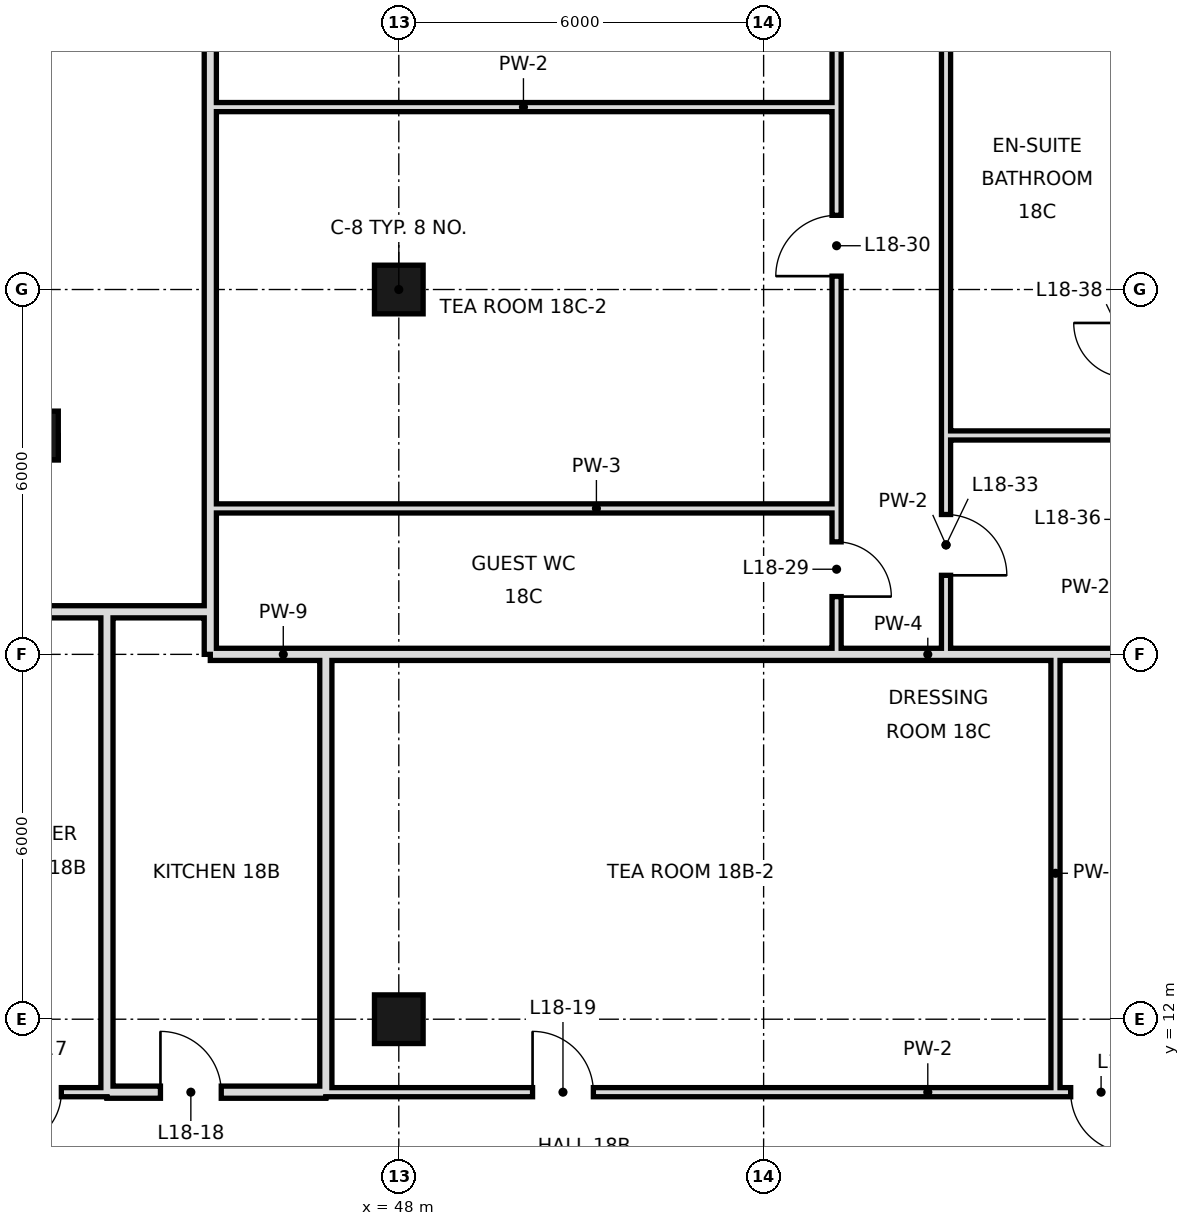
"""IFC4 building model, lengths in metres.
Left out: names, types, materials, properties, quantities, classifications, styles, units other than length and angle.
Written with IfcOpenShell. Run it as: python <this file> out.ifc"""

import sys

from ifc_helpers import new_model, si_unit, direction, frame, frame_2d, origin, origin_2d, place, context, subcontext, project, spatial, rectangle, hollow_rectangle, extrude, element, fill, save


model = new_model("IFC4")
c1 = context("Model", 3, precision=1e-05, world=origin(), true_north=direction((0.0, 1.0)))
c2 = subcontext(c1, "Body", "Model", "MODEL_VIEW")
j1 = project(units=[si_unit("LENGTHUNIT", "METRE"), si_unit("PLANEANGLEUNIT", "RADIAN")], contexts=[c1])
p1 = place(None, origin())
s1 = spatial("IfcSite", under=j1, at=p1, CompositionType="ELEMENT")
p2 = place(p1, origin())
s2 = spatial("IfcBuilding", under=s1, at=p2, CompositionType="ELEMENT")
p3 = place(p2, frame((0.0, 0.0, 85.8)))
s3 = spatial("IfcBuildingStorey", under=s2, at=p3, CompositionType="ELEMENT", Elevation=85.8)
p4 = place(p3, frame((42.0, 21.6, 0.0), z_axis=(0.0, 0.0, 1.0), x_axis=(1.0, 0.0, 0.0)))
e1 = element("IfcColumn", 1, at=p4, inside=s3, PredefinedType="COLUMN", context=c2, shape_type="SweptSolid", body=[
    extrude(hollow_rectangle(XDim=0.8, YDim=0.8, WallThickness=0.06, at=origin_2d()), origin(), (0.0, 0.0, 1.0), 4.4),
])
for number, where, z_axis, x_axis in (
    (2, (48.0, 12.0, 0.0), (0.0, 0.0, 1.0), (1.0, 0.0, 0.0)),
    (3, (48.0, 24.0, 0.0), (0.0, 0.0, 1.0), (1.0, 0.0, 0.0)),
):
    element("IfcColumn", number, at=place(p3, frame(where, z_axis=z_axis, x_axis=x_axis)), inside=s3, PredefinedType="COLUMN", context=c2, shape_type="SweptSolid", body=[
        extrude(hollow_rectangle(XDim=0.8, YDim=0.8, WallThickness=0.04, at=origin_2d()), origin(), (0.0, 0.0, 1.0), 4.4),
    ])
p5 = place(p3, frame((43.2, 10.8, 0.0), z_axis=(0.0, 0.0, 1.0), x_axis=(0.0, 1.0, 0.0)))
e4 = element("IfcWall", 4, at=p5, inside=s3, PredefinedType="SOLIDWALL", context=c2, shape_type="SweptSolid", body=[
    extrude(rectangle(XDim=7.9, YDim=0.2, at=frame_2d((3.95, 0.0))), origin(), (0.0, 0.0, 1.0), 3.4),
])
p6 = place(p3, frame((44.9, 18.7, 0.0), z_axis=(0.0, 0.0, 1.0), x_axis=(0.0, 1.0, 0.0)))
e5 = element("IfcWall", 5, at=p6, inside=s3, PredefinedType="SOLIDWALL", context=c2, shape_type="SweptSolid", body=[
    extrude(rectangle(XDim=25.1, YDim=0.2, at=frame_2d((12.55, 0.0))), origin(), (0.0, 0.0, 1.0), 3.65),
])
p7 = place(p6, frame((22.72, 0.0, 0.0)))
e6 = element("IfcOpeningElement", 6, at=p7, cuts=e5, PredefinedType="OPENING", context=c2, shape_type="SweptSolid", body=[
    extrude(rectangle(XDim=1.2, YDim=2.4, at=frame_2d((0.6, 1.2))), frame((0.0, 0.11, 0.0), z_axis=(0.0, -1.0, 0.0), x_axis=(1.0, 0.0, 0.0)), (0.0, 0.0, 1.0), 0.22),
])
p8 = place(p3, frame((44.9, 18.0, 0.0), z_axis=(0.0, 0.0, 1.0), x_axis=(0.0, 1.0, 0.0)))
e7 = element("IfcWall", 7, at=p8, inside=s3, PredefinedType="SOLIDWALL", context=c2, shape_type="SweptSolid", body=[
    extrude(rectangle(XDim=0.7, YDim=0.2, at=frame_2d((0.35, 0.0))), origin(), (0.0, 0.0, 1.0), 3.65),
])
p9 = place(p3, frame((46.8, 10.8, 0.0), z_axis=(0.0, 0.0, 1.0), x_axis=(0.0, 1.0, 0.0)))
e8 = element("IfcWall", 8, at=p9, inside=s3, PredefinedType="SOLIDWALL", context=c2, shape_type="SweptSolid", body=[
    extrude(rectangle(XDim=7.2, YDim=0.2, at=frame_2d((3.6, 0.0))), origin(), (0.0, 0.0, 1.0), 3.4),
])
p10 = place(p3, frame((55.2, 20.4, 0.0), z_axis=(0.0, 0.0, 1.0), x_axis=(0.0, 1.0, 0.0)))
e9 = element("IfcWall", 9, at=p10, inside=s3, PredefinedType="PARTITIONING", context=c2, shape_type="SweptSolid", body=[
    extrude(rectangle(XDim=23.4, YDim=0.15, at=frame_2d((11.7, 0.0))), origin(), (0.0, 0.0, 1.0), 4.1),
])
p11 = place(p10, frame((19.84, 0.0, 0.0)))
e10 = element("IfcOpeningElement", 10, at=p11, cuts=e9, PredefinedType="OPENING", context=c2, shape_type="SweptSolid", body=[
    extrude(rectangle(XDim=1.0, YDim=2.4, at=frame_2d((0.5, 1.2))), frame((0.0, 0.085, 0.0), z_axis=(0.0, -1.0, 0.0), x_axis=(1.0, 0.0, 0.0)), (0.0, 0.0, 1.0), 0.17),
])
p12 = place(p10, frame((3.82, 0.0, 0.0)))
e11 = element("IfcOpeningElement", 11, at=p12, cuts=e9, PredefinedType="OPENING", context=c2, shape_type="SweptSolid", body=[
    extrude(rectangle(XDim=1.0, YDim=2.4, at=frame_2d((0.5, 1.2))), frame((0.0, 0.085, 0.0), z_axis=(0.0, -1.0, 0.0), x_axis=(1.0, 0.0, 0.0)), (0.0, 0.0, 1.0), 0.17),
])
p13 = place(p10, frame((14.2, 0.0, 0.0)))
e12 = element("IfcOpeningElement", 12, at=p13, cuts=e9, PredefinedType="OPENING", context=c2, shape_type="SweptSolid", body=[
    extrude(rectangle(XDim=1.0, YDim=2.4, at=frame_2d((0.5, 1.2))), frame((0.0, 0.085, 0.0), z_axis=(0.0, -1.0, 0.0), x_axis=(1.0, 0.0, 0.0)), (0.0, 0.0, 1.0), 0.17),
])
p14 = place(p3, frame((55.2, 18.0, 0.0), z_axis=(0.0, 0.0, 1.0), x_axis=(0.0, 1.0, 0.0)))
e13 = element("IfcWall", 13, at=p14, inside=s3, PredefinedType="PARTITIONING", context=c2, shape_type="SweptSolid", body=[
    extrude(rectangle(XDim=2.4, YDim=0.15, at=frame_2d((1.2, 0.0))), origin(), (0.0, 0.0, 1.0), 4.1),
])
p15 = place(p14, frame((0.95, 0.0, 0.0)))
e14 = element("IfcOpeningElement", 14, at=p15, cuts=e13, PredefinedType="OPENING", context=c2, shape_type="SweptSolid", body=[
    extrude(rectangle(XDim=0.9, YDim=2.4, at=frame_2d((0.45, 1.2))), frame((0.0, 0.085, 0.0), z_axis=(0.0, -1.0, 0.0), x_axis=(1.0, 0.0, 0.0)), (0.0, 0.0, 1.0), 0.17),
])
p16 = place(p3, frame((57.0, 18.0, 0.0), z_axis=(0.0, 0.0, 1.0), x_axis=(0.0, 1.0, 0.0)))
e15 = element("IfcWall", 15, at=p16, inside=s3, PredefinedType="PARTITIONING", context=c2, shape_type="SweptSolid", body=[
    extrude(rectangle(XDim=3.6, YDim=0.15, at=frame_2d((1.8, 0.0))), origin(), (0.0, 0.0, 1.0), 4.1),
])
p17 = place(p16, frame((1.3, 0.0, 0.0)))
e16 = element("IfcOpeningElement", 16, at=p17, cuts=e15, PredefinedType="OPENING", context=c2, shape_type="SweptSolid", body=[
    extrude(rectangle(XDim=1.0, YDim=2.4, at=frame_2d((0.5, 1.2))), frame((0.0, 0.085, 0.0), z_axis=(0.0, -1.0, 0.0), x_axis=(1.0, 0.0, 0.0)), (0.0, 0.0, 1.0), 0.17),
])
p18 = place(p3, frame((57.0, 21.6, 0.0), z_axis=(0.0, 0.0, 1.0), x_axis=(0.0, 1.0, 0.0)))
e17 = element("IfcWall", 17, at=p18, inside=s3, PredefinedType="PARTITIONING", context=c2, shape_type="SweptSolid", body=[
    extrude(rectangle(XDim=8.4, YDim=0.15, at=frame_2d((4.2, 0.0))), origin(), (0.0, 0.0, 1.0), 4.1),
])
p19 = place(p3, frame((58.8, 10.8, 0.0), z_axis=(0.0, 0.0, 1.0), x_axis=(0.0, 1.0, 0.0)))
e18 = element("IfcWall", 18, at=p19, inside=s3, PredefinedType="PARTITIONING", context=c2, shape_type="SweptSolid", body=[
    extrude(rectangle(XDim=7.2, YDim=0.15, at=frame_2d((3.6, 0.0))), origin(), (0.0, 0.0, 1.0), 4.1),
])
p20 = place(p3, frame((43.2, 10.8, 0.0), z_axis=(0.0, 0.0, 1.0), x_axis=(1.0, 0.0, 0.0)))
e19 = element("IfcWall", 19, at=p20, inside=s3, PredefinedType="SOLIDWALL", context=c2, shape_type="SweptSolid", body=[
    extrude(rectangle(XDim=3.6, YDim=0.2, at=frame_2d((1.8, 0.0))), origin(), (0.0, 0.0, 1.0), 4.1),
])
p21 = place(p20, frame((0.88, 0.0, 0.0)))
e20 = element("IfcOpeningElement", 20, at=p21, cuts=e19, PredefinedType="OPENING", context=c2, shape_type="SweptSolid", body=[
    extrude(rectangle(XDim=1.0, YDim=2.4, at=frame_2d((0.5, 1.2))), frame((0.0, 0.11, 0.0), z_axis=(0.0, -1.0, 0.0), x_axis=(1.0, 0.0, 0.0)), (0.0, 0.0, 1.0), 0.22),
])
p22 = place(p3, frame((46.8, 10.8, 0.0), z_axis=(0.0, 0.0, 1.0), x_axis=(1.0, 0.0, 0.0)))
e21 = element("IfcWall", 21, at=p22, inside=s3, PredefinedType="PARTITIONING", context=c2, shape_type="SweptSolid", body=[
    extrude(rectangle(XDim=19.8, YDim=0.15, at=frame_2d((9.9, 0.0))), origin(), (0.0, 0.0, 1.0), 4.1),
])
p23 = place(p22, frame((3.4, 0.0, 0.0)))
e22 = element("IfcOpeningElement", 22, at=p23, cuts=e21, PredefinedType="OPENING", context=c2, shape_type="SweptSolid", body=[
    extrude(rectangle(XDim=1.0, YDim=2.4, at=frame_2d((0.5, 1.2))), frame((0.0, 0.085, 0.0), z_axis=(0.0, -1.0, 0.0), x_axis=(1.0, 0.0, 0.0)), (0.0, 0.0, 1.0), 0.17),
])
p24 = place(p22, frame((12.25, 0.0, 0.0)))
e23 = element("IfcOpeningElement", 23, at=p24, cuts=e21, PredefinedType="OPENING", context=c2, shape_type="SweptSolid", body=[
    extrude(rectangle(XDim=1.0, YDim=2.4, at=frame_2d((0.5, 1.2))), frame((0.0, 0.085, 0.0), z_axis=(0.0, -1.0, 0.0), x_axis=(1.0, 0.0, 0.0)), (0.0, 0.0, 1.0), 0.17),
])
p25 = place(p3, frame((40.8, 10.8, 0.0), z_axis=(0.0, 0.0, 1.0), x_axis=(1.0, 0.0, 0.0)))
e24 = element("IfcWall", 24, at=p25, inside=s3, PredefinedType="PARTITIONING", context=c2, shape_type="SweptSolid", body=[
    extrude(rectangle(XDim=2.4, YDim=0.15, at=frame_2d((1.2, 0.0))), origin(), (0.0, 0.0, 1.0), 4.1),
])
p26 = place(p25, frame((0.75, 0.0, 0.0)))
e25 = element("IfcOpeningElement", 25, at=p26, cuts=e24, PredefinedType="OPENING", context=c2, shape_type="SweptSolid", body=[
    extrude(rectangle(XDim=0.9, YDim=2.4, at=frame_2d((0.45, 1.2))), frame((0.0, 0.085, 0.0), z_axis=(0.0, -1.0, 0.0), x_axis=(1.0, 0.0, 0.0)), (0.0, 0.0, 1.0), 0.17),
])
p27 = place(p3, frame((44.9, 18.0, 0.0), z_axis=(0.0, 0.0, 1.0), x_axis=(1.0, 0.0, 0.0)))
e26 = element("IfcWall", 26, at=p27, inside=s3, PredefinedType="SOLIDWALL", context=c2, shape_type="SweptSolid", body=[
    extrude(rectangle(XDim=1.9, YDim=0.2, at=frame_2d((0.95, 0.0))), origin(), (0.0, 0.0, 1.0), 3.65),
])
p28 = place(p3, frame((46.8, 18.0, 0.0), z_axis=(0.0, 0.0, 1.0), x_axis=(1.0, 0.0, 0.0)))
e27 = element("IfcWall", 27, at=p28, inside=s3, PredefinedType="SOLIDWALL", context=c2, shape_type="SweptSolid", body=[
    extrude(rectangle(XDim=19.8, YDim=0.2, at=frame_2d((9.9, 0.0))), origin(), (0.0, 0.0, 1.0), 3.2),
])
p29 = place(p3, frame((5.4, 18.7, 0.0), z_axis=(0.0, 0.0, 1.0), x_axis=(1.0, 0.0, 0.0)))
e28 = element("IfcWall", 28, at=p29, inside=s3, PredefinedType="SOLIDWALL", context=c2, shape_type="SweptSolid", body=[
    extrude(rectangle(XDim=37.8, YDim=0.2, at=frame_2d((18.9, 0.0))), origin(), (0.0, 0.0, 1.0), 3.4),
])
p30 = place(p29, frame((27.6, 0.0, 0.0)))
e29 = element("IfcOpeningElement", 29, at=p30, cuts=e28, PredefinedType="OPENING", context=c2, shape_type="SweptSolid", body=[
    extrude(rectangle(XDim=1.2, YDim=2.4, at=frame_2d((0.6, 1.2))), frame((0.0, 0.11, 0.0), z_axis=(0.0, -1.0, 0.0), x_axis=(1.0, 0.0, 0.0)), (0.0, 0.0, 1.0), 0.22),
])
p31 = place(p29, frame((32.4, 0.0, 0.0)))
e30 = element("IfcOpeningElement", 30, at=p31, cuts=e28, PredefinedType="OPENING", context=c2, shape_type="SweptSolid", body=[
    extrude(rectangle(XDim=1.2, YDim=2.4, at=frame_2d((0.6, 1.2))), frame((0.0, 0.11, 0.0), z_axis=(0.0, -1.0, 0.0), x_axis=(1.0, 0.0, 0.0)), (0.0, 0.0, 1.0), 0.22),
])
p32 = place(p3, frame((43.2, 18.7, 0.0), z_axis=(0.0, 0.0, 1.0), x_axis=(1.0, 0.0, 0.0)))
e31 = element("IfcWall", 31, at=p32, inside=s3, PredefinedType="SOLIDWALL", context=c2, shape_type="SweptSolid", body=[
    extrude(rectangle(XDim=1.7, YDim=0.2, at=frame_2d((0.85, 0.0))), origin(), (0.0, 0.0, 1.0), 4.1),
])
p33 = place(p3, frame((44.9, 20.4, 0.0), z_axis=(0.0, 0.0, 1.0), x_axis=(1.0, 0.0, 0.0)))
e32 = element("IfcWall", 32, at=p33, inside=s3, PredefinedType="PARTITIONING", context=c2, shape_type="SweptSolid", body=[
    extrude(rectangle(XDim=10.3, YDim=0.15, at=frame_2d((5.15, 0.0))), origin(), (0.0, 0.0, 1.0), 4.1),
])
p34 = place(p3, frame((57.0, 21.6, 0.0), z_axis=(0.0, 0.0, 1.0), x_axis=(1.0, 0.0, 0.0)))
e33 = element("IfcWall", 33, at=p34, inside=s3, PredefinedType="PARTITIONING", context=c2, shape_type="SweptSolid", body=[
    extrude(rectangle(XDim=3.0, YDim=0.15, at=frame_2d((1.5, 0.0))), origin(), (0.0, 0.0, 1.0), 4.1),
])
p35 = place(p3, frame((44.9, 27.0, 0.0), z_axis=(0.0, 0.0, 1.0), x_axis=(1.0, 0.0, 0.0)))
e34 = element("IfcWall", 34, at=p35, inside=s3, PredefinedType="PARTITIONING", context=c2, shape_type="SweptSolid", body=[
    extrude(rectangle(XDim=10.3, YDim=0.15, at=frame_2d((5.15, 0.0))), origin(), (0.0, 0.0, 1.0), 4.1),
])
p36 = place(p3, frame((5.6, 21.4, 0.0), z_axis=(0.0, 0.0, 1.0), x_axis=(1.0, 0.0, 0.0)))
e35 = element("IfcWall", 35, at=p36, inside=s3, PredefinedType="SOLIDWALL", context=c2, shape_type="SweptSolid", body=[
    extrude(rectangle(XDim=36.8, YDim=0.4, at=frame_2d((18.4, 0.0))), origin(), (0.0, 0.0, 1.0), 4.1),
])
p37 = place(p36, frame((8.5, 0.0, 0.0)))
e36 = element("IfcOpeningElement", 36, at=p37, cuts=e35, PredefinedType="OPENING", context=c2, shape_type="SweptSolid", body=[
    extrude(rectangle(XDim=1.8, YDim=2.1, at=frame_2d((0.9, 1.05))), frame((0.0, 0.21, 0.0), z_axis=(0.0, -1.0, 0.0), x_axis=(1.0, 0.0, 0.0)), (0.0, 0.0, 1.0), 0.42),
])
p38 = place(p36, frame((17.5, 0.0, 0.0)))
e37 = element("IfcOpeningElement", 37, at=p38, cuts=e35, PredefinedType="OPENING", context=c2, shape_type="SweptSolid", body=[
    extrude(rectangle(XDim=1.8, YDim=2.1, at=frame_2d((0.9, 1.05))), frame((0.0, 0.21, 0.0), z_axis=(0.0, -1.0, 0.0), x_axis=(1.0, 0.0, 0.0)), (0.0, 0.0, 1.0), 0.42),
])
p39 = place(p36, frame((26.5, 0.0, 0.0)))
e38 = element("IfcOpeningElement", 38, at=p39, cuts=e35, PredefinedType="OPENING", context=c2, shape_type="SweptSolid", body=[
    extrude(rectangle(XDim=1.8, YDim=2.1, at=frame_2d((0.9, 1.05))), frame((0.0, 0.21, 0.0), z_axis=(0.0, -1.0, 0.0), x_axis=(1.0, 0.0, 0.0)), (0.0, 0.0, 1.0), 0.42),
])
p40 = place(p36, frame((4.5, 0.0, 0.0)))
e39 = element("IfcOpeningElement", 39, at=p40, cuts=e35, PredefinedType="OPENING", context=c2, shape_type="SweptSolid", body=[
    extrude(rectangle(XDim=1.2, YDim=2.1, at=frame_2d((0.6, 1.05))), frame((0.0, 0.21, 0.0), z_axis=(0.0, -1.0, 0.0), x_axis=(1.0, 0.0, 0.0)), (0.0, 0.0, 1.0), 0.42),
])
p41 = place(p36, frame((31.1, 0.0, 0.0)))
e40 = element("IfcOpeningElement", 40, at=p41, cuts=e35, PredefinedType="OPENING", context=c2, shape_type="SweptSolid", body=[
    extrude(rectangle(XDim=1.2, YDim=2.1, at=frame_2d((0.6, 1.05))), frame((0.0, 0.21, 0.0), z_axis=(0.0, -1.0, 0.0), x_axis=(1.0, 0.0, 0.0)), (0.0, 0.0, 1.0), 0.42),
])
p42 = place(p26, frame((0.9, 0.0, 0.0), z_axis=(0.0, 0.0, 1.0), x_axis=(-1.0, 0.0, 0.0)))
e41 = element("IfcDoor", 41, at=p42, inside=s3, OperationType="SINGLE_SWING_RIGHT", PredefinedType="DOOR", context=c2, shape_type="SweptSolid", body=[
    extrude(rectangle(XDim=0.9, YDim=2.4, at=frame_2d((0.45, 1.2))), frame((0.0, 0.025, 0.0), z_axis=(0.0, -1.0, 0.0), x_axis=(1.0, 0.0, 0.0)), (0.0, 0.0, 1.0), 0.05),
])
fill(e25, e41)
p43 = place(p21, origin())
e42 = element("IfcDoor", 42, at=p43, inside=s3, OperationType="SINGLE_SWING_LEFT", PredefinedType="DOOR", context=c2, shape_type="SweptSolid", body=[
    extrude(rectangle(XDim=1.0, YDim=2.4, at=frame_2d((0.5, 1.2))), frame((0.0, 0.025, 0.0), z_axis=(0.0, -1.0, 0.0), x_axis=(1.0, 0.0, 0.0)), (0.0, 0.0, 1.0), 0.05),
])
fill(e20, e42)
p44 = place(p23, origin())
e43 = element("IfcDoor", 43, at=p44, inside=s3, OperationType="SINGLE_SWING_LEFT", PredefinedType="DOOR", context=c2, shape_type="SweptSolid", body=[
    extrude(rectangle(XDim=1.0, YDim=2.4, at=frame_2d((0.5, 1.2))), frame((0.0, 0.025, 0.0), z_axis=(0.0, -1.0, 0.0), x_axis=(1.0, 0.0, 0.0)), (0.0, 0.0, 1.0), 0.05),
])
fill(e22, e43)
p45 = place(p24, origin())
e44 = element("IfcDoor", 44, at=p45, inside=s3, OperationType="SINGLE_SWING_RIGHT", PredefinedType="DOOR", context=c2, shape_type="SweptSolid", body=[
    extrude(rectangle(XDim=1.0, YDim=2.4, at=frame_2d((0.5, 1.2))), frame((0.0, 0.025, 0.0), z_axis=(0.0, -1.0, 0.0), x_axis=(1.0, 0.0, 0.0)), (0.0, 0.0, 1.0), 0.05),
])
fill(e23, e44)
p46 = place(p15, frame((0.9, 0.0, 0.0), z_axis=(0.0, 0.0, 1.0), x_axis=(-1.0, 0.0, 0.0)))
e45 = element("IfcDoor", 45, at=p46, inside=s3, OperationType="SINGLE_SWING_RIGHT", PredefinedType="DOOR", context=c2, shape_type="SweptSolid", body=[
    extrude(rectangle(XDim=0.9, YDim=2.4, at=frame_2d((0.45, 1.2))), frame((0.0, 0.025, 0.0), z_axis=(0.0, -1.0, 0.0), x_axis=(1.0, 0.0, 0.0)), (0.0, 0.0, 1.0), 0.05),
])
fill(e14, e45)
p47 = place(p12, origin())
e46 = element("IfcDoor", 46, at=p47, inside=s3, OperationType="SINGLE_SWING_LEFT", PredefinedType="DOOR", context=c2, shape_type="SweptSolid", body=[
    extrude(rectangle(XDim=1.0, YDim=2.4, at=frame_2d((0.5, 1.2))), frame((0.0, 0.025, 0.0), z_axis=(0.0, -1.0, 0.0), x_axis=(1.0, 0.0, 0.0)), (0.0, 0.0, 1.0), 0.05),
])
fill(e11, e46)
p48 = place(p17, frame((1.0, 0.0, 0.0), z_axis=(0.0, 0.0, 1.0), x_axis=(-1.0, 0.0, 0.0)))
e47 = element("IfcDoor", 47, at=p48, inside=s3, OperationType="SINGLE_SWING_RIGHT", PredefinedType="DOOR", context=c2, shape_type="SweptSolid", body=[
    extrude(rectangle(XDim=1.0, YDim=2.4, at=frame_2d((0.5, 1.2))), frame((0.0, 0.025, 0.0), z_axis=(0.0, -1.0, 0.0), x_axis=(1.0, 0.0, 0.0)), (0.0, 0.0, 1.0), 0.05),
])
fill(e16, e47)
save(model, sys.argv[1])
